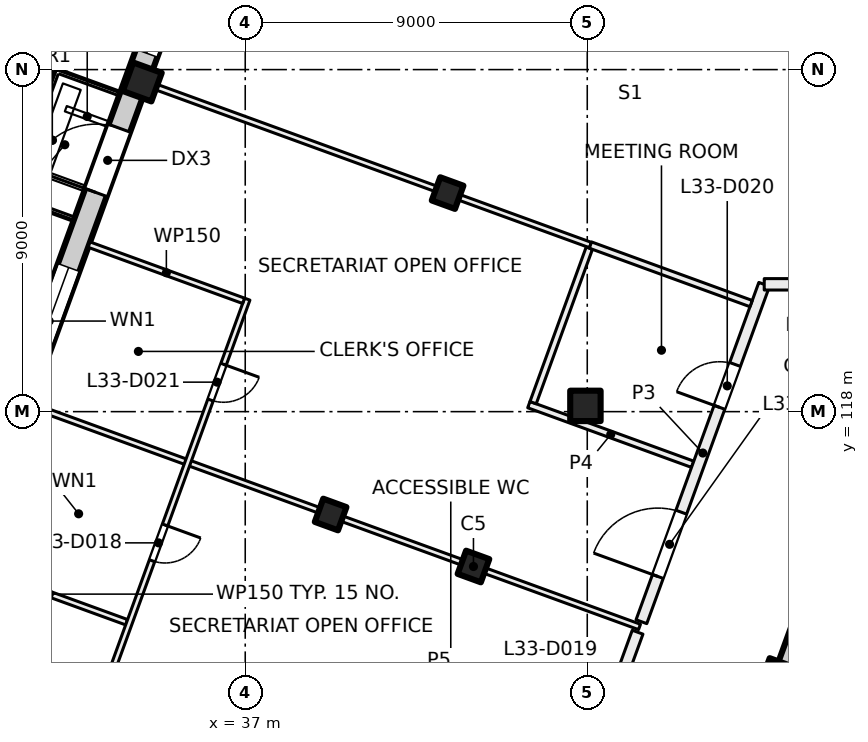
"""IFC4 building model, lengths in metres.
Left out: names, types, materials, properties, quantities, classifications, styles, units other than length and angle.
Written with IfcOpenShell. Run it as: python <this file> out.ifc"""

import sys

from ifc_helpers import new_model, si_unit, direction, frame, frame_2d, origin, origin_2d, place, context, subcontext, project, spatial, rectangle, extrude, element, fill, save


model = new_model("IFC4")
c1 = context("Model", 3, precision=1e-05, world=origin(), true_north=direction((0.0, 1.0)))
c2 = subcontext(c1, "Body", "Model", "MODEL_VIEW")
j1 = project(units=[si_unit("LENGTHUNIT", "METRE"), si_unit("PLANEANGLEUNIT", "RADIAN")], contexts=[c1])
p1 = place(None, origin())
s1 = spatial("IfcSite", under=j1, at=p1, CompositionType="ELEMENT")
p2 = place(p1, origin())
s2 = spatial("IfcBuilding", under=s1, at=p2, CompositionType="ELEMENT")
p3 = place(p2, frame((0.0, 0.0, 142.5)))
s3 = spatial("IfcBuildingStorey", under=s2, at=p3, CompositionType="ELEMENT", Elevation=142.5)
p4 = place(p3, frame((45.952, 118.152, 0.0), z_axis=(0.0, 0.0, 1.0), x_axis=(1.0, 0.0, 0.0)))
e1 = element("IfcColumn", 1, at=p4, inside=s3, PredefinedType="COLUMN", context=c2, shape_type="SweptSolid", body=[
    extrude(rectangle(XDim=0.8, YDim=0.8, at=origin_2d()), origin(), (0.0, 0.0, 1.0), 4.0),
])
for number, where, z_axis, x_axis in (
    (2, (43.006, 113.925, 0.0), (0.0, 0.0, 1.0), (-0.342, -0.94, 0.0)),
    (3, (42.325, 123.751, 0.0), (0.0, 0.0, 1.0), (-0.342, -0.94, 0.0)),
    (4, (39.247, 115.293, 0.0), (0.0, 0.0, 1.0), (-0.342, -0.94, 0.0)),
):
    element("IfcColumn", number, at=place(p3, frame(where, z_axis=z_axis, x_axis=x_axis)), inside=s3, PredefinedType="COLUMN", context=c2, shape_type="SweptSolid", body=[
        extrude(rectangle(XDim=0.65, YDim=0.65, at=origin_2d()), origin(), (0.0, 0.0, 1.0), 4.0),
    ])
for number, where, z_axis, x_axis in (
    (5, (51.04, 111.001, 0.0), (0.0, 0.0, 1.0), (-0.342, -0.94, 0.0)),
    (6, (34.291, 126.675, 0.0), (0.0, 0.0, 1.0), (-0.342, -0.94, 0.0)),
):
    element("IfcColumn", number, at=place(p3, frame(where, z_axis=z_axis, x_axis=x_axis)), inside=s3, PredefinedType="COLUMN", context=c2, shape_type="SweptSolid", body=[
        extrude(rectangle(XDim=0.8, YDim=0.8, at=origin_2d()), origin(), (0.0, 0.0, 1.0), 4.0),
    ])
p5 = place(p3, frame((52.212, 113.783, 0.0), z_axis=(0.0, 0.0, 1.0), x_axis=(-0.34202521188, -0.939690775968, 0.0)))
e7 = element("IfcWall", 7, at=p5, inside=s3, PredefinedType="SOLIDWALL", context=c2, shape_type="SweptSolid", body=[
    extrude(rectangle(XDim=21.745, YDim=0.6, at=frame_2d((10.873, 0.0))), origin(), (0.0, 0.0, 1.0), 3.625),
])
p6 = place(p5, frame((3.765, 0.0, 0.9)))
e8 = element("IfcOpeningElement", 8, at=p6, cuts=e7, PredefinedType="OPENING", context=c2, shape_type="SweptSolid", body=[
    extrude(rectangle(XDim=3.0, YDim=2.4, at=frame_2d((1.5, 1.2))), frame((0.0, 0.31, 0.0), z_axis=(0.0, -1.0, 0.0), x_axis=(1.0, 0.0, 0.0)), (0.0, 0.0, 1.0), 0.62),
])
p7 = place(p5, frame((8.865, 0.0, 0.0)))
e9 = element("IfcOpeningElement", 9, at=p7, cuts=e7, PredefinedType="OPENING", context=c2, shape_type="SweptSolid", body=[
    extrude(rectangle(XDim=1.8, YDim=2.4, at=frame_2d((0.9, 1.2))), frame((0.0, 0.31, 0.0), z_axis=(0.0, -1.0, 0.0), x_axis=(1.0, 0.0, 0.0)), (0.0, 0.0, 1.0), 0.62),
])
p8 = place(p5, frame((12.765, 0.0, 0.9)))
e10 = element("IfcOpeningElement", 10, at=p8, cuts=e7, PredefinedType="OPENING", context=c2, shape_type="SweptSolid", body=[
    extrude(rectangle(XDim=3.0, YDim=2.4, at=frame_2d((1.5, 1.2))), frame((0.0, 0.31, 0.0), z_axis=(0.0, -1.0, 0.0), x_axis=(1.0, 0.0, 0.0)), (0.0, 0.0, 1.0), 0.62),
])
p9 = place(p5, frame((17.265, 0.0, 0.9)))
e11 = element("IfcOpeningElement", 11, at=p9, cuts=e7, PredefinedType="OPENING", context=c2, shape_type="SweptSolid", body=[
    extrude(rectangle(XDim=3.0, YDim=2.4, at=frame_2d((1.5, 1.2))), frame((0.0, 0.31, 0.0), z_axis=(0.0, -1.0, 0.0), x_axis=(1.0, 0.0, 0.0)), (0.0, 0.0, 1.0), 0.62),
])
p10 = place(p3, frame((24.666, 100.669, 0.0), z_axis=(0.0, 0.0, 1.0), x_axis=(0.34201964167, 0.939692803373, 0.0)))
e12 = element("IfcWall", 12, at=p10, inside=s3, PredefinedType="SOLIDWALL", context=c2, shape_type="SweptSolid", body=[
    extrude(rectangle(XDim=32.884, YDim=0.6, at=frame_2d((16.442, 0.0))), origin(), (0.0, 0.0, 1.0), 3.625),
])
p11 = place(p10, frame((1.48, 0.0, 0.9)))
e13 = element("IfcOpeningElement", 13, at=p11, cuts=e12, PredefinedType="OPENING", context=c2, shape_type="SweptSolid", body=[
    extrude(rectangle(XDim=3.0, YDim=2.4, at=frame_2d((1.5, 1.2))), frame((0.0, 0.31, 0.0), z_axis=(0.0, -1.0, 0.0), x_axis=(1.0, 0.0, 0.0)), (0.0, 0.0, 1.0), 0.62),
])
p12 = place(p10, frame((5.98, 0.0, 0.9)))
e14 = element("IfcOpeningElement", 14, at=p12, cuts=e12, PredefinedType="OPENING", context=c2, shape_type="SweptSolid", body=[
    extrude(rectangle(XDim=3.0, YDim=2.4, at=frame_2d((1.5, 1.2))), frame((0.0, 0.31, 0.0), z_axis=(0.0, -1.0, 0.0), x_axis=(1.0, 0.0, 0.0)), (0.0, 0.0, 1.0), 0.62),
])
p13 = place(p10, frame((11.08, 0.0, 0.0)))
e15 = element("IfcOpeningElement", 15, at=p13, cuts=e12, PredefinedType="OPENING", context=c2, shape_type="SweptSolid", body=[
    extrude(rectangle(XDim=1.8, YDim=2.4, at=frame_2d((0.9, 1.2))), frame((0.0, 0.31, 0.0), z_axis=(0.0, -1.0, 0.0), x_axis=(1.0, 0.0, 0.0)), (0.0, 0.0, 1.0), 0.62),
])
p14 = place(p10, frame((14.98, 0.0, 0.9)))
e16 = element("IfcOpeningElement", 16, at=p14, cuts=e12, PredefinedType="OPENING", context=c2, shape_type="SweptSolid", body=[
    extrude(rectangle(XDim=3.0, YDim=2.4, at=frame_2d((1.5, 1.2))), frame((0.0, 0.31, 0.0), z_axis=(0.0, -1.0, 0.0), x_axis=(1.0, 0.0, 0.0)), (0.0, 0.0, 1.0), 0.62),
])
p15 = place(p10, frame((19.48, 0.0, 0.9)))
e17 = element("IfcOpeningElement", 17, at=p15, cuts=e12, PredefinedType="OPENING", context=c2, shape_type="SweptSolid", body=[
    extrude(rectangle(XDim=3.0, YDim=2.4, at=frame_2d((1.5, 1.2))), frame((0.0, 0.31, 0.0), z_axis=(0.0, -1.0, 0.0), x_axis=(1.0, 0.0, 0.0)), (0.0, 0.0, 1.0), 0.62),
])
p16 = place(p10, frame((24.58, 0.0, 0.0)))
e18 = element("IfcOpeningElement", 18, at=p16, cuts=e12, PredefinedType="OPENING", context=c2, shape_type="SweptSolid", body=[
    extrude(rectangle(XDim=1.8, YDim=2.4, at=frame_2d((0.9, 1.2))), frame((0.0, 0.31, 0.0), z_axis=(0.0, -1.0, 0.0), x_axis=(1.0, 0.0, 0.0)), (0.0, 0.0, 1.0), 0.62),
])
p17 = place(p10, frame((28.48, 0.0, 0.9)))
e19 = element("IfcOpeningElement", 19, at=p17, cuts=e12, PredefinedType="OPENING", context=c2, shape_type="SweptSolid", body=[
    extrude(rectangle(XDim=3.0, YDim=2.4, at=frame_2d((1.5, 1.2))), frame((0.0, 0.31, 0.0), z_axis=(0.0, -1.0, 0.0), x_axis=(1.0, 0.0, 0.0)), (0.0, 0.0, 1.0), 0.62),
])
p18 = place(p3, frame((29.814, 113.938, 0.0), z_axis=(0.0, 0.0, 1.0), x_axis=(0.93973078783, -0.341915262023, 0.0)))
e20 = element("IfcWall", 20, at=p18, inside=s3, PredefinedType="PARTITIONING", context=c2, shape_type="SweptSolid", body=[
    extrude(rectangle(XDim=4.326, YDim=0.15, at=frame_2d((2.163, 0.0))), origin(), (0.0, 0.0, 1.0), 3.625),
])
p19 = place(p3, frame((31.353, 118.166, 0.0), z_axis=(0.0, 0.0, 1.0), x_axis=(0.939701413127, -0.341995985602, 0.0)))
e21 = element("IfcWall", 21, at=p19, inside=s3, PredefinedType="PARTITIONING", context=c2, shape_type="SweptSolid", body=[
    extrude(rectangle(XDim=17.05, YDim=0.15, at=frame_2d((8.525, 0.0))), origin(), (0.0, 0.0, 1.0), 3.625),
])
p20 = place(p3, frame((37.053, 120.96, 0.0), z_axis=(0.0, 0.0, 1.0), x_axis=(-0.342023551531, -0.939691380293, 0.0)))
e22 = element("IfcWall", 22, at=p20, inside=s3, PredefinedType="PARTITIONING", context=c2, shape_type="SweptSolid", body=[
    extrude(rectangle(XDim=13.488, YDim=0.15, at=frame_2d((6.744, 0.0))), origin(), (0.0, 0.0, 1.0), 3.625),
])
p21 = place(p20, frame((10.791, 0.0, 0.0)))
e23 = element("IfcOpeningElement", 23, at=p21, cuts=e22, PredefinedType="OPENING", context=c2, shape_type="SweptSolid", body=[
    extrude(rectangle(XDim=1.0, YDim=2.1, at=frame_2d((0.5, 1.05))), frame((0.0, 0.085, 0.0), z_axis=(0.0, -1.0, 0.0), x_axis=(1.0, 0.0, 0.0)), (0.0, 0.0, 1.0), 0.17),
])
p22 = place(p20, frame((6.324, 0.0, 0.0)))
e24 = element("IfcOpeningElement", 24, at=p22, cuts=e22, PredefinedType="OPENING", context=c2, shape_type="SweptSolid", body=[
    extrude(rectangle(XDim=1.0, YDim=2.1, at=frame_2d((0.5, 1.05))), frame((0.0, 0.085, 0.0), z_axis=(0.0, -1.0, 0.0), x_axis=(1.0, 0.0, 0.0)), (0.0, 0.0, 1.0), 0.17),
])
p23 = place(p20, frame((1.824, 0.0, 0.0)))
e25 = element("IfcOpeningElement", 25, at=p23, cuts=e22, PredefinedType="OPENING", context=c2, shape_type="SweptSolid", body=[
    extrude(rectangle(XDim=1.0, YDim=2.1, at=frame_2d((0.5, 1.05))), frame((0.0, 0.085, 0.0), z_axis=(0.0, -1.0, 0.0), x_axis=(1.0, 0.0, 0.0)), (0.0, 0.0, 1.0), 0.17),
])
p24 = place(p3, frame((32.892, 122.395, 0.0), z_axis=(0.0, 0.0, 1.0), x_axis=(0.93973078783, -0.341915262023, 0.0)))
e26 = element("IfcWall", 26, at=p24, inside=s3, PredefinedType="PARTITIONING", context=c2, shape_type="SweptSolid", body=[
    extrude(rectangle(XDim=4.326, YDim=0.15, at=frame_2d((2.163, 0.0))), origin(), (0.0, 0.0, 1.0), 3.625),
])
p25 = place(p3, frame((47.325, 112.197, 0.0), z_axis=(0.0, 0.0, 1.0), x_axis=(-0.341976837053, -0.93970838185, 0.0)))
e27 = element("IfcWall", 27, at=p25, inside=s3, PredefinedType="PARTITIONING", context=c2, shape_type="SweptSolid", body=[
    extrude(rectangle(XDim=13.416, YDim=0.3, at=frame_2d((6.708, 0.0))), origin(), (0.0, 0.0, 1.0), 3.625),
])
p26 = place(p25, frame((8.354, 0.0, 0.0)))
e28 = element("IfcOpeningElement", 28, at=p26, cuts=e27, PredefinedType="OPENING", context=c2, shape_type="SweptSolid", body=[
    extrude(rectangle(XDim=1.0, YDim=2.1, at=frame_2d((0.5, 1.05))), frame((0.0, 0.16, 0.0), z_axis=(0.0, -1.0, 0.0), x_axis=(1.0, 0.0, 0.0)), (0.0, 0.0, 1.0), 0.32),
])
p27 = place(p25, frame((1.267, 0.0, 0.0)))
e29 = element("IfcOpeningElement", 29, at=p27, cuts=e27, PredefinedType="OPENING", context=c2, shape_type="SweptSolid", body=[
    extrude(rectangle(XDim=1.8, YDim=2.1, at=frame_2d((0.9, 1.05))), frame((0.0, 0.16, 0.0), z_axis=(0.0, -1.0, 0.0), x_axis=(1.0, 0.0, 0.0)), (0.0, 0.0, 1.0), 0.32),
])
p28 = place(p3, frame((44.463, 118.184, 0.0), z_axis=(0.0, 0.0, 1.0), x_axis=(0.939667480086, -0.342089208934, 0.0)))
e30 = element("IfcWall", 30, at=p28, inside=s3, PredefinedType="PARTITIONING", context=c2, shape_type="SweptSolid", body=[
    extrude(rectangle(XDim=4.587, YDim=0.175, at=frame_2d((2.293, 0.0))), origin(), (0.0, 0.0, 1.0), 3.625),
])
p29 = place(p3, frame((46.084, 122.383, 0.0), z_axis=(0.0, 0.0, 1.0), x_axis=(-0.939703144457, 0.341991228392, 0.0)))
e31 = element("IfcWall", 31, at=p29, inside=s3, PredefinedType="PARTITIONING", context=c2, shape_type="SweptSolid", body=[
    extrude(rectangle(XDim=12.401, YDim=0.15, at=frame_2d((6.2, 0.0))), origin(), (0.0, 0.0, 1.0), 3.625),
])
p30 = place(p3, frame((46.054, 122.301, 0.0), z_axis=(0.0, 0.0, 1.0), x_axis=(-0.341915262023, -0.93973078783, 0.0)))
e32 = element("IfcWall", 32, at=p30, inside=s3, PredefinedType="PARTITIONING", context=c2, shape_type="SweptSolid", body=[
    extrude(rectangle(XDim=4.326, YDim=0.175, at=frame_2d((2.163, 0.0))), origin(), (0.0, 0.0, 1.0), 3.625),
])
p31 = place(p3, frame((47.425, 112.473, 0.0), z_axis=(0.0, 0.0, 1.0), x_axis=(0.34204602842, 0.939683198978, 0.0)))
e33 = element("IfcWall", 33, at=p31, inside=s3, PredefinedType="PARTITIONING", context=c2, shape_type="SweptSolid", body=[
    extrude(rectangle(XDim=9.446, YDim=0.3, at=frame_2d((4.723, 0.0))), origin(), (0.0, 0.0, 1.0), 3.625),
])
p32 = place(p31, frame((6.003, 0.0, 0.0)))
e34 = element("IfcOpeningElement", 34, at=p32, cuts=e33, PredefinedType="OPENING", context=c2, shape_type="SweptSolid", body=[
    extrude(rectangle(XDim=1.2, YDim=2.1, at=frame_2d((0.6, 1.05))), frame((0.0, 0.16, 0.0), z_axis=(0.0, -1.0, 0.0), x_axis=(1.0, 0.0, 0.0)), (0.0, 0.0, 1.0), 0.32),
])
p33 = place(p31, frame((1.267, 0.0, 0.0)))
e35 = element("IfcOpeningElement", 35, at=p33, cuts=e33, PredefinedType="OPENING", context=c2, shape_type="SweptSolid", body=[
    extrude(rectangle(XDim=1.8, YDim=2.1, at=frame_2d((0.9, 1.05))), frame((0.0, 0.16, 0.0), z_axis=(0.0, -1.0, 0.0), x_axis=(1.0, 0.0, 0.0)), (0.0, 0.0, 1.0), 0.32),
])
p34 = place(p3, frame((50.312, 120.843, 0.0), z_axis=(0.0, 0.0, 1.0), x_axis=(-0.939609529273, 0.342248349154, 0.0)))
e36 = element("IfcWall", 36, at=p34, inside=s3, PredefinedType="PARTITIONING", context=c2, shape_type="SweptSolid", body=[
    extrude(rectangle(XDim=4.5, YDim=0.175, at=frame_2d((2.25, 0.0))), origin(), (0.0, 0.0, 1.0), 3.625),
])
p35 = place(p3, frame((50.657, 121.35, 0.0), z_axis=(0.0, 0.0, 1.0), x_axis=(1.0, 0.0, 0.0)))
e37 = element("IfcWall", 37, at=p35, inside=s3, PredefinedType="PARTITIONING", context=c2, shape_type="SweptSolid", body=[
    extrude(rectangle(XDim=35.096, YDim=0.3, at=frame_2d((17.548, 0.0))), origin(), (0.0, 0.0, 1.0), 3.625),
])
p36 = place(p35, frame((26.243, 0.0, 0.0)))
e38 = element("IfcOpeningElement", 38, at=p36, cuts=e37, PredefinedType="OPENING", context=c2, shape_type="SweptSolid", body=[
    extrude(rectangle(XDim=1.2, YDim=2.1, at=frame_2d((0.6, 1.05))), frame((0.0, 0.16, 0.0), z_axis=(0.0, -1.0, 0.0), x_axis=(1.0, 0.0, 0.0)), (0.0, 0.0, 1.0), 0.32),
])
p37 = place(p35, frame((22.593, 0.0, 0.0)))
e39 = element("IfcOpeningElement", 39, at=p37, cuts=e37, PredefinedType="OPENING", context=c2, shape_type="SweptSolid", body=[
    extrude(rectangle(XDim=1.0, YDim=2.1, at=frame_2d((0.5, 1.05))), frame((0.0, 0.16, 0.0), z_axis=(0.0, -1.0, 0.0), x_axis=(1.0, 0.0, 0.0)), (0.0, 0.0, 1.0), 0.32),
])
p38 = place(p35, frame((31.193, 0.0, 0.0)))
e40 = element("IfcOpeningElement", 40, at=p38, cuts=e37, PredefinedType="OPENING", context=c2, shape_type="SweptSolid", body=[
    extrude(rectangle(XDim=1.8, YDim=2.1, at=frame_2d((0.9, 1.05))), frame((0.0, 0.16, 0.0), z_axis=(0.0, -1.0, 0.0), x_axis=(1.0, 0.0, 0.0)), (0.0, 0.0, 1.0), 0.32),
])
p39 = place(p35, frame((18.743, 0.0, 0.0)))
e41 = element("IfcOpeningElement", 41, at=p39, cuts=e37, PredefinedType="OPENING", context=c2, shape_type="SweptSolid", body=[
    extrude(rectangle(XDim=1.2, YDim=2.1, at=frame_2d((0.6, 1.05))), frame((0.0, 0.16, 0.0), z_axis=(0.0, -1.0, 0.0), x_axis=(1.0, 0.0, 0.0)), (0.0, 0.0, 1.0), 0.32),
])
p40 = place(p35, frame((14.243, 0.0, 0.0)))
e42 = element("IfcOpeningElement", 42, at=p40, cuts=e37, PredefinedType="OPENING", context=c2, shape_type="SweptSolid", body=[
    extrude(rectangle(XDim=1.2, YDim=2.1, at=frame_2d((0.6, 1.05))), frame((0.0, 0.16, 0.0), z_axis=(0.0, -1.0, 0.0), x_axis=(1.0, 0.0, 0.0)), (0.0, 0.0, 1.0), 0.32),
])
p41 = place(p35, frame((10.693, 0.0, 0.0)))
e43 = element("IfcOpeningElement", 43, at=p41, cuts=e37, PredefinedType="OPENING", context=c2, shape_type="SweptSolid", body=[
    extrude(rectangle(XDim=0.8, YDim=2.1, at=frame_2d((0.4, 1.05))), frame((0.0, 0.16, 0.0), z_axis=(0.0, -1.0, 0.0), x_axis=(1.0, 0.0, 0.0)), (0.0, 0.0, 1.0), 0.32),
])
p42 = place(p35, frame((5.693, 0.0, 0.0)))
e44 = element("IfcOpeningElement", 44, at=p42, cuts=e37, PredefinedType="OPENING", context=c2, shape_type="SweptSolid", body=[
    extrude(rectangle(XDim=1.8, YDim=2.1, at=frame_2d((0.9, 1.05))), frame((0.0, 0.16, 0.0), z_axis=(0.0, -1.0, 0.0), x_axis=(1.0, 0.0, 0.0)), (0.0, 0.0, 1.0), 0.32),
])
p43 = place(p35, frame((0.896, 0.0, 0.0)))
e45 = element("IfcOpeningElement", 45, at=p43, cuts=e37, PredefinedType="OPENING", context=c2, shape_type="SweptSolid", body=[
    extrude(rectangle(XDim=1.8, YDim=2.1, at=frame_2d((0.9, 1.05))), frame((0.0, 0.16, 0.0), z_axis=(0.0, -1.0, 0.0), x_axis=(1.0, 0.0, 0.0)), (0.0, 0.0, 1.0), 0.32),
])
p44 = place(p15, origin())
e46 = element("IfcWindow", 46, at=p44, inside=s3, PartitioningType="SINGLE_PANEL", PredefinedType="WINDOW", context=c2, shape_type="SweptSolid", body=[
    extrude(rectangle(XDim=3.0, YDim=2.4, at=frame_2d((1.5, 1.2))), frame((0.0, 0.03, 0.0), z_axis=(0.0, -1.0, 0.0), x_axis=(1.0, 0.0, 0.0)), (0.0, 0.0, 1.0), 0.06),
])
fill(e17, e46)
p45 = place(p16, origin())
e47 = element("IfcDoor", 47, at=p45, inside=s3, OperationType="DOUBLE_DOOR_SINGLE_SWING", PredefinedType="DOOR", context=c2, shape_type="SweptSolid", body=[
    extrude(rectangle(XDim=1.8, YDim=2.4, at=frame_2d((0.9, 1.2))), frame((0.0, 0.025, 0.0), z_axis=(0.0, -1.0, 0.0), x_axis=(1.0, 0.0, 0.0)), (0.0, 0.0, 1.0), 0.05),
])
fill(e18, e47)
p46 = place(p17, origin())
e48 = element("IfcWindow", 48, at=p46, inside=s3, PartitioningType="SINGLE_PANEL", PredefinedType="WINDOW", context=c2, shape_type="SweptSolid", body=[
    extrude(rectangle(XDim=3.0, YDim=2.4, at=frame_2d((1.5, 1.2))), frame((0.0, 0.03, 0.0), z_axis=(0.0, -1.0, 0.0), x_axis=(1.0, 0.0, 0.0)), (0.0, 0.0, 1.0), 0.06),
])
fill(e19, e48)
p47 = place(p22, origin())
e49 = element("IfcDoor", 49, at=p47, inside=s3, OperationType="SINGLE_SWING_RIGHT", PredefinedType="DOOR", context=c2, shape_type="SweptSolid", body=[
    extrude(rectangle(XDim=1.0, YDim=2.1, at=frame_2d((0.5, 1.05))), frame((0.0, 0.025, 0.0), z_axis=(0.0, -1.0, 0.0), x_axis=(1.0, 0.0, 0.0)), (0.0, 0.0, 1.0), 0.05),
])
fill(e24, e49)
p48 = place(p32, origin())
e50 = element("IfcDoor", 50, at=p48, inside=s3, OperationType="DOUBLE_DOOR_SINGLE_SWING", PredefinedType="DOOR", context=c2, shape_type="SweptSolid", body=[
    extrude(rectangle(XDim=1.2, YDim=2.1, at=frame_2d((0.6, 1.05))), frame((0.0, 0.025, 0.0), z_axis=(0.0, -1.0, 0.0), x_axis=(1.0, 0.0, 0.0)), (0.0, 0.0, 1.0), 0.05),
])
fill(e34, e50)
p49 = place(p23, origin())
e51 = element("IfcDoor", 51, at=p49, inside=s3, OperationType="SINGLE_SWING_LEFT", PredefinedType="DOOR", context=c2, shape_type="SweptSolid", body=[
    extrude(rectangle(XDim=1.0, YDim=2.1, at=frame_2d((0.5, 1.05))), frame((0.0, 0.025, 0.0), z_axis=(0.0, -1.0, 0.0), x_axis=(1.0, 0.0, 0.0)), (0.0, 0.0, 1.0), 0.05),
])
fill(e25, e51)
p50 = place(p33, origin())
e52 = element("IfcDoor", 52, at=p50, inside=s3, OperationType="DOUBLE_DOOR_SINGLE_SWING", PredefinedType="DOOR", context=c2, shape_type="SweptSolid", body=[
    extrude(rectangle(XDim=1.8, YDim=2.1, at=frame_2d((0.9, 1.05))), frame((0.0, 0.025, 0.0), z_axis=(0.0, -1.0, 0.0), x_axis=(1.0, 0.0, 0.0)), (0.0, 0.0, 1.0), 0.05),
])
fill(e35, e52)
save(model, sys.argv[1])
